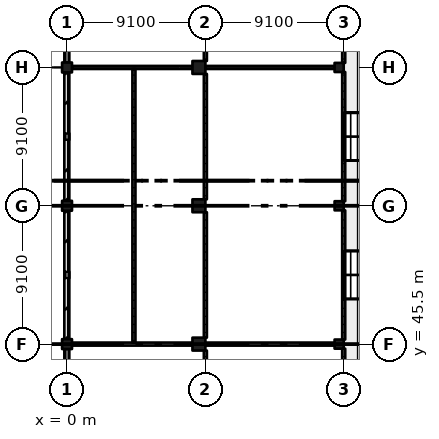
"""IFC4 building model, lengths in metres.
Left out: names, types, materials, properties, quantities, classifications, styles, units other than length and angle.
Written with IfcOpenShell. Run it as: python <this file> out.ifc"""

import sys

from ifc_helpers import new_model, si_unit, direction, frame, frame_2d, origin, origin_2d, place, context, subcontext, project, spatial, rectangle, extrude, element, fill, save


model = new_model("IFC4")
c1 = context("Model", 3, precision=1e-05, world=origin(), true_north=direction((0.0, 1.0)))
c2 = subcontext(c1, "Body", "Model", "MODEL_VIEW")
j1 = project(units=[si_unit("LENGTHUNIT", "METRE"), si_unit("PLANEANGLEUNIT", "RADIAN")], contexts=[c1])
p1 = place(None, origin())
s1 = spatial("IfcSite", under=j1, at=p1, CompositionType="ELEMENT")
p2 = place(p1, origin())
s2 = spatial("IfcBuilding", under=s1, at=p2, CompositionType="ELEMENT")
p3 = place(p2, origin())
s3 = spatial("IfcBuildingStorey", under=s2, at=p3, CompositionType="ELEMENT", Elevation=0.0)
for number, where, z_axis, x_axis in (
    (1, (0.0, 45.5, -0.4), (0.0, 0.0, 1.0), (1.0, 0.0, 0.0)),
    (2, (0.0, 54.6, -0.4), (0.0, 0.0, 1.0), (1.0, 0.0, 0.0)),
    (3, (0.0, 63.7, -0.4), (0.0, 0.0, 1.0), (1.0, 0.0, 0.0)),
):
    element("IfcColumn", number, at=place(p3, frame(where, z_axis=z_axis, x_axis=x_axis)), inside=s3, PredefinedType="COLUMN", context=c2, shape_type="SweptSolid", body=[
        extrude(rectangle(XDim=0.65, YDim=0.65, at=origin_2d()), origin(), (0.0, 0.0, 1.0), 6.77),
    ])
for number, where, z_axis, x_axis in (
    (4, (8.675, 45.5, -0.4), (0.0, 0.0, 1.0), (1.0, 0.0, 0.0)),
    (5, (8.675, 54.6, -0.4), (0.0, 0.0, 1.0), (1.0, 0.0, 0.0)),
    (6, (8.675, 63.7, -0.4), (0.0, 0.0, 1.0), (1.0, 0.0, 0.0)),
):
    element("IfcColumn", number, at=place(p3, frame(where, z_axis=z_axis, x_axis=x_axis)), inside=s3, PredefinedType="COLUMN", context=c2, shape_type="SweptSolid", body=[
        extrude(rectangle(XDim=0.85, YDim=0.85, at=origin_2d()), origin(), (0.0, 0.0, 1.0), 6.77),
    ])
for number, where, z_axis, x_axis in (
    (7, (17.9, 45.5, -0.4), (0.0, 0.0, 1.0), (1.0, 0.0, 0.0)),
    (8, (17.9, 54.6, -0.4), (0.0, 0.0, 1.0), (1.0, 0.0, 0.0)),
    (9, (17.9, 63.7, -0.4), (0.0, 0.0, 1.0), (1.0, 0.0, 0.0)),
):
    element("IfcColumn", number, at=place(p3, frame(where, z_axis=z_axis, x_axis=x_axis)), inside=s3, PredefinedType="COLUMN", context=c2, shape_type="SweptSolid", body=[
        extrude(rectangle(XDim=0.6, YDim=0.6, at=origin_2d()), origin(), (0.0, 0.0, 1.0), 6.77),
    ])
p4 = place(p3, frame((0.0, 72.45, 0.0), z_axis=(0.0, 0.0, 1.0), x_axis=(0.0, -1.0, 0.0)))
e10 = element("IfcWall", 10, at=p4, inside=s3, PredefinedType="SOLIDWALL", context=c2, shape_type="SweptSolid", body=[
    extrude(rectangle(XDim=8.425, YDim=0.3, at=frame_2d((4.212, 0.0))), origin(), (0.0, 0.0, 1.0), 5.27),
])
p5 = place(p3, frame((0.0, 63.375, 0.0), z_axis=(0.0, 0.0, 1.0), x_axis=(0.0, -1.0, 0.0)))
e11 = element("IfcWall", 11, at=p5, inside=s3, PredefinedType="SOLIDWALL", context=c2, shape_type="SweptSolid", body=[
    extrude(rectangle(XDim=8.45, YDim=0.3, at=frame_2d((4.225, 0.0))), origin(), (0.0, 0.0, 1.0), 3.75),
])
p6 = place(p5, frame((4.44, 0.0, 0.0)))
e12 = element("IfcOpeningElement", 12, at=p6, cuts=e11, PredefinedType="OPENING", context=c2, shape_type="SweptSolid", body=[
    extrude(rectangle(XDim=3.6, YDim=2.7, at=frame_2d((1.8, 1.35))), frame((0.0, 0.16, 0.0), z_axis=(0.0, -1.0, 0.0), x_axis=(1.0, 0.0, 0.0)), (0.0, 0.0, 1.0), 0.32),
])
p7 = place(p5, frame((0.41, 0.0, 0.0)))
e13 = element("IfcOpeningElement", 13, at=p7, cuts=e11, PredefinedType="OPENING", context=c2, shape_type="SweptSolid", body=[
    extrude(rectangle(XDim=3.6, YDim=2.7, at=frame_2d((1.8, 1.35))), frame((0.0, 0.16, 0.0), z_axis=(0.0, -1.0, 0.0), x_axis=(1.0, 0.0, 0.0)), (0.0, 0.0, 1.0), 0.32),
])
p8 = place(p3, frame((0.0, 59.365, 3.75), z_axis=(0.0, 0.0, 1.0), x_axis=(0.0, -1.0, 0.0)))
e14 = element("IfcWall", 14, at=p8, inside=s3, PredefinedType="SOLIDWALL", context=c2, shape_type="SweptSolid", body=[
    extrude(rectangle(XDim=0.43, YDim=0.3, at=frame_2d((0.215, 0.0))), origin(), (0.0, 0.0, 1.0), 1.52),
])
p9 = place(p3, frame((0.0, 54.275, 0.0), z_axis=(0.0, 0.0, 1.0), x_axis=(0.0, -1.0, 0.0)))
e15 = element("IfcWall", 15, at=p9, inside=s3, PredefinedType="SOLIDWALL", context=c2, shape_type="SweptSolid", body=[
    extrude(rectangle(XDim=8.45, YDim=0.3, at=frame_2d((4.225, 0.0))), origin(), (0.0, 0.0, 1.0), 3.75),
])
p10 = place(p9, frame((4.44, 0.0, 0.0)))
e16 = element("IfcOpeningElement", 16, at=p10, cuts=e15, PredefinedType="OPENING", context=c2, shape_type="SweptSolid", body=[
    extrude(rectangle(XDim=3.6, YDim=2.7, at=frame_2d((1.8, 1.35))), frame((0.0, 0.16, 0.0), z_axis=(0.0, -1.0, 0.0), x_axis=(1.0, 0.0, 0.0)), (0.0, 0.0, 1.0), 0.32),
])
p11 = place(p9, frame((0.41, 0.0, 0.0)))
e17 = element("IfcOpeningElement", 17, at=p11, cuts=e15, PredefinedType="OPENING", context=c2, shape_type="SweptSolid", body=[
    extrude(rectangle(XDim=3.6, YDim=2.7, at=frame_2d((1.8, 1.35))), frame((0.0, 0.16, 0.0), z_axis=(0.0, -1.0, 0.0), x_axis=(1.0, 0.0, 0.0)), (0.0, 0.0, 1.0), 0.32),
])
p12 = place(p3, frame((0.0, 50.265, 3.75), z_axis=(0.0, 0.0, 1.0), x_axis=(0.0, -1.0, 0.0)))
e18 = element("IfcWall", 18, at=p12, inside=s3, PredefinedType="SOLIDWALL", context=c2, shape_type="SweptSolid", body=[
    extrude(rectangle(XDim=0.43, YDim=0.3, at=frame_2d((0.215, 0.0))), origin(), (0.0, 0.0, 1.0), 1.52),
])
p13 = place(p3, frame((0.0, 45.175, 0.0), z_axis=(0.0, 0.0, 1.0), x_axis=(0.0, -1.0, 0.0)))
e19 = element("IfcWall", 19, at=p13, inside=s3, PredefinedType="SOLIDWALL", context=c2, shape_type="SweptSolid", body=[
    extrude(rectangle(XDim=8.425, YDim=0.3, at=frame_2d((4.212, 0.0))), origin(), (0.0, 0.0, 1.0), 5.27),
])
for number, where, z_axis, x_axis in (
    (20, (0.325, 63.7, 0.0), (0.0, 0.0, 1.0), (1.0, 0.0, 0.0)),
    (21, (0.325, 45.5, 0.0), (0.0, 0.0, 1.0), (1.0, 0.0, 0.0)),
):
    element("IfcWall", number, at=place(p3, frame(where, z_axis=z_axis, x_axis=x_axis)), inside=s3, PredefinedType="PARTITIONING", context=c2, shape_type="SweptSolid", body=[
        extrude(rectangle(XDim=7.925, YDim=0.2, at=frame_2d((3.962, 0.0))), origin(), (0.0, 0.0, 1.0), 5.32),
    ])
p14 = place(p3, frame((4.4, 45.6, 0.0), z_axis=(0.0, 0.0, 1.0), x_axis=(0.0, 1.0, 0.0)))
e22 = element("IfcWall", 22, at=p14, inside=s3, PredefinedType="PARTITIONING", context=c2, shape_type="SweptSolid", body=[
    extrude(rectangle(XDim=18.0, YDim=0.2, at=frame_2d((9.0, 0.0))), origin(), (0.0, 0.0, 1.0), 6.02),
])
p15 = place(p14, frame((0.65, 0.0, 0.0)))
e23 = element("IfcOpeningElement", 23, at=p15, cuts=e22, PredefinedType="OPENING", context=c2, shape_type="SweptSolid", body=[
    extrude(rectangle(XDim=1.8, YDim=2.4, at=frame_2d((0.9, 1.2))), frame((0.0, 0.11, 0.0), z_axis=(0.0, -1.0, 0.0), x_axis=(1.0, 0.0, 0.0)), (0.0, 0.0, 1.0), 0.22),
])
p16 = place(p14, frame((3.55, 0.0, 0.0)))
e24 = element("IfcOpeningElement", 24, at=p16, cuts=e22, PredefinedType="OPENING", context=c2, shape_type="SweptSolid", body=[
    extrude(rectangle(XDim=1.8, YDim=2.4, at=frame_2d((0.9, 1.2))), frame((0.0, 0.11, 0.0), z_axis=(0.0, -1.0, 0.0), x_axis=(1.0, 0.0, 0.0)), (0.0, 0.0, 1.0), 0.22),
])
p17 = place(p14, frame((6.65, 0.0, 0.0)))
e25 = element("IfcOpeningElement", 25, at=p17, cuts=e22, PredefinedType="OPENING", context=c2, shape_type="SweptSolid", body=[
    extrude(rectangle(XDim=1.8, YDim=2.4, at=frame_2d((0.9, 1.2))), frame((0.0, 0.11, 0.0), z_axis=(0.0, -1.0, 0.0), x_axis=(1.0, 0.0, 0.0)), (0.0, 0.0, 1.0), 0.22),
])
p18 = place(p14, frame((9.65, 0.0, 0.0)))
e26 = element("IfcOpeningElement", 26, at=p18, cuts=e22, PredefinedType="OPENING", context=c2, shape_type="SweptSolid", body=[
    extrude(rectangle(XDim=1.8, YDim=2.4, at=frame_2d((0.9, 1.2))), frame((0.0, 0.11, 0.0), z_axis=(0.0, -1.0, 0.0), x_axis=(1.0, 0.0, 0.0)), (0.0, 0.0, 1.0), 0.22),
])
p19 = place(p14, frame((12.65, 0.0, 0.0)))
e27 = element("IfcOpeningElement", 27, at=p19, cuts=e22, PredefinedType="OPENING", context=c2, shape_type="SweptSolid", body=[
    extrude(rectangle(XDim=1.8, YDim=2.4, at=frame_2d((0.9, 1.2))), frame((0.0, 0.11, 0.0), z_axis=(0.0, -1.0, 0.0), x_axis=(1.0, 0.0, 0.0)), (0.0, 0.0, 1.0), 0.22),
])
p20 = place(p14, frame((15.65, 0.0, 0.0)))
e28 = element("IfcOpeningElement", 28, at=p20, cuts=e22, PredefinedType="OPENING", context=c2, shape_type="SweptSolid", body=[
    extrude(rectangle(XDim=1.8, YDim=2.4, at=frame_2d((0.9, 1.2))), frame((0.0, 0.11, 0.0), z_axis=(0.0, -1.0, 0.0), x_axis=(1.0, 0.0, 0.0)), (0.0, 0.0, 1.0), 0.22),
])
p21 = place(p3, frame((9.1, 41.075, 0.0), z_axis=(0.0, 0.0, 1.0), x_axis=(0.0, 1.0, 0.0)))
e29 = element("IfcWall", 29, at=p21, inside=s3, PredefinedType="PARTITIONING", context=c2, shape_type="SweptSolid", body=[
    extrude(rectangle(XDim=4.0, YDim=0.2, at=frame_2d((2.0, 0.0))), origin(), (0.0, 0.0, 1.0), 5.32),
])
p22 = place(p21, frame((1.45, 0.0, 0.0)))
e30 = element("IfcOpeningElement", 30, at=p22, cuts=e29, PredefinedType="OPENING", context=c2, shape_type="SweptSolid", body=[
    extrude(rectangle(XDim=1.0, YDim=2.1, at=frame_2d((0.5, 1.05))), frame((0.0, 0.11, 0.0), z_axis=(0.0, -1.0, 0.0), x_axis=(1.0, 0.0, 0.0)), (0.0, 0.0, 1.0), 0.22),
])
p23 = place(p3, frame((9.1, 45.925, 0.0), z_axis=(0.0, 0.0, 1.0), x_axis=(0.0, 1.0, 0.0)))
e31 = element("IfcWall", 31, at=p23, inside=s3, PredefinedType="PARTITIONING", context=c2, shape_type="SweptSolid", body=[
    extrude(rectangle(XDim=8.25, YDim=0.2, at=frame_2d((4.125, 0.0))), origin(), (0.0, 0.0, 1.0), 5.32),
])
p24 = place(p23, frame((1.15, 0.0, 0.0)))
e32 = element("IfcOpeningElement", 32, at=p24, cuts=e31, PredefinedType="OPENING", context=c2, shape_type="SweptSolid", body=[
    extrude(rectangle(XDim=1.8, YDim=2.4, at=frame_2d((0.9, 1.2))), frame((0.0, 0.11, 0.0), z_axis=(0.0, -1.0, 0.0), x_axis=(1.0, 0.0, 0.0)), (0.0, 0.0, 1.0), 0.22),
])
p25 = place(p23, frame((5.25, 0.0, 0.0)))
e33 = element("IfcOpeningElement", 33, at=p25, cuts=e31, PredefinedType="OPENING", context=c2, shape_type="SweptSolid", body=[
    extrude(rectangle(XDim=1.8, YDim=2.4, at=frame_2d((0.9, 1.2))), frame((0.0, 0.11, 0.0), z_axis=(0.0, -1.0, 0.0), x_axis=(1.0, 0.0, 0.0)), (0.0, 0.0, 1.0), 0.22),
])
p26 = place(p23, frame((3.45, 0.0, 0.0)))
e34 = element("IfcOpeningElement", 34, at=p26, cuts=e31, PredefinedType="OPENING", context=c2, shape_type="SweptSolid", body=[
    extrude(rectangle(XDim=1.8, YDim=2.4, at=frame_2d((0.9, 1.2))), frame((0.0, 0.11, 0.0), z_axis=(0.0, -1.0, 0.0), x_axis=(1.0, 0.0, 0.0)), (0.0, 0.0, 1.0), 0.22),
])
p27 = place(p3, frame((9.1, 55.025, 0.0), z_axis=(0.0, 0.0, 1.0), x_axis=(0.0, 1.0, 0.0)))
e35 = element("IfcWall", 35, at=p27, inside=s3, PredefinedType="PARTITIONING", context=c2, shape_type="SweptSolid", body=[
    extrude(rectangle(XDim=8.25, YDim=0.2, at=frame_2d((4.125, 0.0))), origin(), (0.0, 0.0, 1.0), 5.32),
])
p28 = place(p27, frame((1.15, 0.0, 0.0)))
e36 = element("IfcOpeningElement", 36, at=p28, cuts=e35, PredefinedType="OPENING", context=c2, shape_type="SweptSolid", body=[
    extrude(rectangle(XDim=1.8, YDim=2.4, at=frame_2d((0.9, 1.2))), frame((0.0, 0.11, 0.0), z_axis=(0.0, -1.0, 0.0), x_axis=(1.0, 0.0, 0.0)), (0.0, 0.0, 1.0), 0.22),
])
p29 = place(p27, frame((5.25, 0.0, 0.0)))
e37 = element("IfcOpeningElement", 37, at=p29, cuts=e35, PredefinedType="OPENING", context=c2, shape_type="SweptSolid", body=[
    extrude(rectangle(XDim=1.8, YDim=2.4, at=frame_2d((0.9, 1.2))), frame((0.0, 0.11, 0.0), z_axis=(0.0, -1.0, 0.0), x_axis=(1.0, 0.0, 0.0)), (0.0, 0.0, 1.0), 0.22),
])
p30 = place(p3, frame((9.1, 64.125, 0.0), z_axis=(0.0, 0.0, 1.0), x_axis=(0.0, 1.0, 0.0)))
e38 = element("IfcWall", 38, at=p30, inside=s3, PredefinedType="PARTITIONING", context=c2, shape_type="SweptSolid", body=[
    extrude(rectangle(XDim=4.025, YDim=0.2, at=frame_2d((2.012, 0.0))), origin(), (0.0, 0.0, 1.0), 5.32),
])
p31 = place(p30, frame((1.45, 0.0, 0.0)))
e39 = element("IfcOpeningElement", 39, at=p31, cuts=e38, PredefinedType="OPENING", context=c2, shape_type="SweptSolid", body=[
    extrude(rectangle(XDim=1.2, YDim=2.1, at=frame_2d((0.6, 1.05))), frame((0.0, 0.11, 0.0), z_axis=(0.0, -1.0, 0.0), x_axis=(1.0, 0.0, 0.0)), (0.0, 0.0, 1.0), 0.22),
])
p32 = place(p3, frame((17.6, 45.5, 0.0), z_axis=(0.0, 0.0, 1.0), x_axis=(-1.0, 0.0, 0.0)))
e40 = element("IfcWall", 40, at=p32, inside=s3, PredefinedType="PARTITIONING", context=c2, shape_type="SweptSolid", body=[
    extrude(rectangle(XDim=8.5, YDim=0.2, at=frame_2d((4.25, 0.0))), origin(), (0.0, 0.0, 1.0), 5.27),
])
p33 = place(p32, frame((0.65, 0.0, 0.0)))
e41 = element("IfcOpeningElement", 41, at=p33, cuts=e40, PredefinedType="OPENING", context=c2, shape_type="SweptSolid", body=[
    extrude(rectangle(XDim=3.0, YDim=2.4, at=frame_2d((1.5, 1.2))), frame((0.0, 0.11, 0.0), z_axis=(0.0, -1.0, 0.0), x_axis=(1.0, 0.0, 0.0)), (0.0, 0.0, 1.0), 0.22),
])
p34 = place(p32, frame((4.85, 0.0, 0.0)))
e42 = element("IfcOpeningElement", 42, at=p34, cuts=e40, PredefinedType="OPENING", context=c2, shape_type="SweptSolid", body=[
    extrude(rectangle(XDim=3.0, YDim=2.4, at=frame_2d((1.5, 1.2))), frame((0.0, 0.11, 0.0), z_axis=(0.0, -1.0, 0.0), x_axis=(1.0, 0.0, 0.0)), (0.0, 0.0, 1.0), 0.22),
])
p35 = place(p3, frame((17.6, 63.7, 0.0), z_axis=(0.0, 0.0, 1.0), x_axis=(-1.0, 0.0, 0.0)))
e43 = element("IfcWall", 43, at=p35, inside=s3, PredefinedType="PARTITIONING", context=c2, shape_type="SweptSolid", body=[
    extrude(rectangle(XDim=8.5, YDim=0.2, at=frame_2d((4.25, 0.0))), origin(), (0.0, 0.0, 1.0), 5.27),
])
p36 = place(p35, frame((0.65, 0.0, 0.0)))
e44 = element("IfcOpeningElement", 44, at=p36, cuts=e43, PredefinedType="OPENING", context=c2, shape_type="SweptSolid", body=[
    extrude(rectangle(XDim=3.0, YDim=2.4, at=frame_2d((1.5, 1.2))), frame((0.0, 0.11, 0.0), z_axis=(0.0, -1.0, 0.0), x_axis=(1.0, 0.0, 0.0)), (0.0, 0.0, 1.0), 0.22),
])
p37 = place(p35, frame((4.85, 0.0, 0.0)))
e45 = element("IfcOpeningElement", 45, at=p37, cuts=e43, PredefinedType="OPENING", context=c2, shape_type="SweptSolid", body=[
    extrude(rectangle(XDim=3.0, YDim=2.4, at=frame_2d((1.5, 1.2))), frame((0.0, 0.11, 0.0), z_axis=(0.0, -1.0, 0.0), x_axis=(1.0, 0.0, 0.0)), (0.0, 0.0, 1.0), 0.22),
])
p38 = place(p3, frame((18.2, 45.2, 0.0), z_axis=(0.0, 0.0, 1.0), x_axis=(0.0, -1.0, 0.0)))
e46 = element("IfcWall", 46, at=p38, inside=s3, PredefinedType="PARTITIONING", context=c2, shape_type="SweptSolid", body=[
    extrude(rectangle(XDim=4.125, YDim=0.2, at=frame_2d((2.062, 0.0))), origin(), (0.0, 0.0, 1.0), 5.02),
])
for number, where, z_axis, x_axis in (
    (47, (18.2, 54.3, 0.0), (0.0, 0.0, 1.0), (0.0, -1.0, 0.0)),
    (48, (18.2, 63.4, 0.0), (0.0, 0.0, 1.0), (0.0, -1.0, 0.0)),
):
    element("IfcWall", number, at=place(p3, frame(where, z_axis=z_axis, x_axis=x_axis)), inside=s3, PredefinedType="PARTITIONING", context=c2, shape_type="SweptSolid", body=[
        extrude(rectangle(XDim=8.5, YDim=0.2, at=frame_2d((4.25, 0.0))), origin(), (0.0, 0.0, 1.0), 5.02),
    ])
p39 = place(p3, frame((18.2, 68.15, 0.0), z_axis=(0.0, 0.0, 1.0), x_axis=(0.0, -1.0, 0.0)))
e49 = element("IfcWall", 49, at=p39, inside=s3, PredefinedType="PARTITIONING", context=c2, shape_type="SweptSolid", body=[
    extrude(rectangle(XDim=4.15, YDim=0.2, at=frame_2d((2.075, 0.0))), origin(), (0.0, 0.0, 1.0), 5.02),
])
p40 = place(p6, frame((3.6, 0.0, 0.0), z_axis=(0.0, 0.0, 1.0), x_axis=(-1.0, 0.0, 0.0)))
e50 = element("IfcDoor", 50, at=p40, inside=s3, OperationType="DOUBLE_DOOR_SINGLE_SWING", PredefinedType="DOOR", context=c2, shape_type="SweptSolid", body=[
    extrude(rectangle(XDim=3.6, YDim=2.7, at=frame_2d((1.8, 1.35))), frame((0.0, 0.025, 0.0), z_axis=(0.0, -1.0, 0.0), x_axis=(1.0, 0.0, 0.0)), (0.0, 0.0, 1.0), 0.05),
])
fill(e12, e50)
p41 = place(p7, frame((3.6, 0.0, 0.0), z_axis=(0.0, 0.0, 1.0), x_axis=(-1.0, 0.0, 0.0)))
e51 = element("IfcDoor", 51, at=p41, inside=s3, OperationType="DOUBLE_DOOR_SINGLE_SWING", PredefinedType="DOOR", context=c2, shape_type="SweptSolid", body=[
    extrude(rectangle(XDim=3.6, YDim=2.7, at=frame_2d((1.8, 1.35))), frame((0.0, 0.025, 0.0), z_axis=(0.0, -1.0, 0.0), x_axis=(1.0, 0.0, 0.0)), (0.0, 0.0, 1.0), 0.05),
])
fill(e13, e51)
p42 = place(p10, frame((3.6, 0.0, 0.0), z_axis=(0.0, 0.0, 1.0), x_axis=(-1.0, 0.0, 0.0)))
e52 = element("IfcDoor", 52, at=p42, inside=s3, OperationType="DOUBLE_DOOR_SINGLE_SWING", PredefinedType="DOOR", context=c2, shape_type="SweptSolid", body=[
    extrude(rectangle(XDim=3.6, YDim=2.7, at=frame_2d((1.8, 1.35))), frame((0.0, 0.025, 0.0), z_axis=(0.0, -1.0, 0.0), x_axis=(1.0, 0.0, 0.0)), (0.0, 0.0, 1.0), 0.05),
])
fill(e16, e52)
p43 = place(p11, frame((3.6, 0.0, 0.0), z_axis=(0.0, 0.0, 1.0), x_axis=(-1.0, 0.0, 0.0)))
e53 = element("IfcDoor", 53, at=p43, inside=s3, OperationType="DOUBLE_DOOR_SINGLE_SWING", PredefinedType="DOOR", context=c2, shape_type="SweptSolid", body=[
    extrude(rectangle(XDim=3.6, YDim=2.7, at=frame_2d((1.8, 1.35))), frame((0.0, 0.025, 0.0), z_axis=(0.0, -1.0, 0.0), x_axis=(1.0, 0.0, 0.0)), (0.0, 0.0, 1.0), 0.05),
])
fill(e17, e53)
p44 = place(p24, origin())
e54 = element("IfcDoor", 54, at=p44, inside=s3, OperationType="DOUBLE_DOOR_SINGLE_SWING", PredefinedType="DOOR", context=c2, shape_type="SweptSolid", body=[
    extrude(rectangle(XDim=1.8, YDim=2.4, at=frame_2d((0.9, 1.2))), frame((0.0, 0.025, 0.0), z_axis=(0.0, -1.0, 0.0), x_axis=(1.0, 0.0, 0.0)), (0.0, 0.0, 1.0), 0.05),
])
fill(e32, e54)
p45 = place(p25, origin())
e55 = element("IfcDoor", 55, at=p45, inside=s3, OperationType="DOUBLE_DOOR_SINGLE_SWING", PredefinedType="DOOR", context=c2, shape_type="SweptSolid", body=[
    extrude(rectangle(XDim=1.8, YDim=2.4, at=frame_2d((0.9, 1.2))), frame((0.0, 0.025, 0.0), z_axis=(0.0, -1.0, 0.0), x_axis=(1.0, 0.0, 0.0)), (0.0, 0.0, 1.0), 0.05),
])
fill(e33, e55)
p46 = place(p26, origin())
e56 = element("IfcDoor", 56, at=p46, inside=s3, OperationType="DOUBLE_DOOR_SINGLE_SWING", PredefinedType="DOOR", context=c2, shape_type="SweptSolid", body=[
    extrude(rectangle(XDim=1.8, YDim=2.4, at=frame_2d((0.9, 1.2))), frame((0.0, 0.025, 0.0), z_axis=(0.0, -1.0, 0.0), x_axis=(1.0, 0.0, 0.0)), (0.0, 0.0, 1.0), 0.05),
])
fill(e34, e56)
p47 = place(p28, origin())
e57 = element("IfcDoor", 57, at=p47, inside=s3, OperationType="DOUBLE_DOOR_SINGLE_SWING", PredefinedType="DOOR", context=c2, shape_type="SweptSolid", body=[
    extrude(rectangle(XDim=1.8, YDim=2.4, at=frame_2d((0.9, 1.2))), frame((0.0, 0.025, 0.0), z_axis=(0.0, -1.0, 0.0), x_axis=(1.0, 0.0, 0.0)), (0.0, 0.0, 1.0), 0.05),
])
fill(e36, e57)
p48 = place(p29, origin())
e58 = element("IfcDoor", 58, at=p48, inside=s3, OperationType="DOUBLE_DOOR_SINGLE_SWING", PredefinedType="DOOR", context=c2, shape_type="SweptSolid", body=[
    extrude(rectangle(XDim=1.8, YDim=2.4, at=frame_2d((0.9, 1.2))), frame((0.0, 0.025, 0.0), z_axis=(0.0, -1.0, 0.0), x_axis=(1.0, 0.0, 0.0)), (0.0, 0.0, 1.0), 0.05),
])
fill(e37, e58)
p49 = place(p36, origin())
e59 = element("IfcDoor", 59, at=p49, inside=s3, OperationType="DOUBLE_DOOR_SINGLE_SWING", PredefinedType="DOOR", context=c2, shape_type="SweptSolid", body=[
    extrude(rectangle(XDim=3.0, YDim=2.4, at=frame_2d((1.5, 1.2))), frame((0.0, 0.025, 0.0), z_axis=(0.0, -1.0, 0.0), x_axis=(1.0, 0.0, 0.0)), (0.0, 0.0, 1.0), 0.05),
])
fill(e44, e59)
p50 = place(p37, origin())
e60 = element("IfcDoor", 60, at=p50, inside=s3, OperationType="DOUBLE_DOOR_SINGLE_SWING", PredefinedType="DOOR", context=c2, shape_type="SweptSolid", body=[
    extrude(rectangle(XDim=3.0, YDim=2.4, at=frame_2d((1.5, 1.2))), frame((0.0, 0.025, 0.0), z_axis=(0.0, -1.0, 0.0), x_axis=(1.0, 0.0, 0.0)), (0.0, 0.0, 1.0), 0.05),
])
fill(e45, e60)
p51 = place(p33, origin())
e61 = element("IfcDoor", 61, at=p51, inside=s3, OperationType="DOUBLE_DOOR_SINGLE_SWING", PredefinedType="DOOR", context=c2, shape_type="SweptSolid", body=[
    extrude(rectangle(XDim=3.0, YDim=2.4, at=frame_2d((1.5, 1.2))), frame((0.0, 0.025, 0.0), z_axis=(0.0, -1.0, 0.0), x_axis=(1.0, 0.0, 0.0)), (0.0, 0.0, 1.0), 0.05),
])
fill(e41, e61)
p52 = place(p34, origin())
e62 = element("IfcDoor", 62, at=p52, inside=s3, OperationType="DOUBLE_DOOR_SINGLE_SWING", PredefinedType="DOOR", context=c2, shape_type="SweptSolid", body=[
    extrude(rectangle(XDim=3.0, YDim=2.4, at=frame_2d((1.5, 1.2))), frame((0.0, 0.025, 0.0), z_axis=(0.0, -1.0, 0.0), x_axis=(1.0, 0.0, 0.0)), (0.0, 0.0, 1.0), 0.05),
])
fill(e42, e62)
p53 = place(p15, origin())
e63 = element("IfcDoor", 63, at=p53, inside=s3, OperationType="DOUBLE_DOOR_SINGLE_SWING", PredefinedType="DOOR", context=c2, shape_type="SweptSolid", body=[
    extrude(rectangle(XDim=1.8, YDim=2.4, at=frame_2d((0.9, 1.2))), frame((0.0, 0.025, 0.0), z_axis=(0.0, -1.0, 0.0), x_axis=(1.0, 0.0, 0.0)), (0.0, 0.0, 1.0), 0.05),
])
fill(e23, e63)
p54 = place(p16, origin())
e64 = element("IfcDoor", 64, at=p54, inside=s3, OperationType="DOUBLE_DOOR_SINGLE_SWING", PredefinedType="DOOR", context=c2, shape_type="SweptSolid", body=[
    extrude(rectangle(XDim=1.8, YDim=2.4, at=frame_2d((0.9, 1.2))), frame((0.0, 0.025, 0.0), z_axis=(0.0, -1.0, 0.0), x_axis=(1.0, 0.0, 0.0)), (0.0, 0.0, 1.0), 0.05),
])
fill(e24, e64)
p55 = place(p17, origin())
e65 = element("IfcDoor", 65, at=p55, inside=s3, OperationType="DOUBLE_DOOR_SINGLE_SWING", PredefinedType="DOOR", context=c2, shape_type="SweptSolid", body=[
    extrude(rectangle(XDim=1.8, YDim=2.4, at=frame_2d((0.9, 1.2))), frame((0.0, 0.025, 0.0), z_axis=(0.0, -1.0, 0.0), x_axis=(1.0, 0.0, 0.0)), (0.0, 0.0, 1.0), 0.05),
])
fill(e25, e65)
p56 = place(p18, origin())
e66 = element("IfcDoor", 66, at=p56, inside=s3, OperationType="DOUBLE_DOOR_SINGLE_SWING", PredefinedType="DOOR", context=c2, shape_type="SweptSolid", body=[
    extrude(rectangle(XDim=1.8, YDim=2.4, at=frame_2d((0.9, 1.2))), frame((0.0, 0.025, 0.0), z_axis=(0.0, -1.0, 0.0), x_axis=(1.0, 0.0, 0.0)), (0.0, 0.0, 1.0), 0.05),
])
fill(e26, e66)
p57 = place(p19, origin())
e67 = element("IfcDoor", 67, at=p57, inside=s3, OperationType="DOUBLE_DOOR_SINGLE_SWING", PredefinedType="DOOR", context=c2, shape_type="SweptSolid", body=[
    extrude(rectangle(XDim=1.8, YDim=2.4, at=frame_2d((0.9, 1.2))), frame((0.0, 0.025, 0.0), z_axis=(0.0, -1.0, 0.0), x_axis=(1.0, 0.0, 0.0)), (0.0, 0.0, 1.0), 0.05),
])
fill(e27, e67)
p58 = place(p20, origin())
e68 = element("IfcDoor", 68, at=p58, inside=s3, OperationType="DOUBLE_DOOR_SINGLE_SWING", PredefinedType="DOOR", context=c2, shape_type="SweptSolid", body=[
    extrude(rectangle(XDim=1.8, YDim=2.4, at=frame_2d((0.9, 1.2))), frame((0.0, 0.025, 0.0), z_axis=(0.0, -1.0, 0.0), x_axis=(1.0, 0.0, 0.0)), (0.0, 0.0, 1.0), 0.05),
])
fill(e28, e68)
save(model, sys.argv[1])
